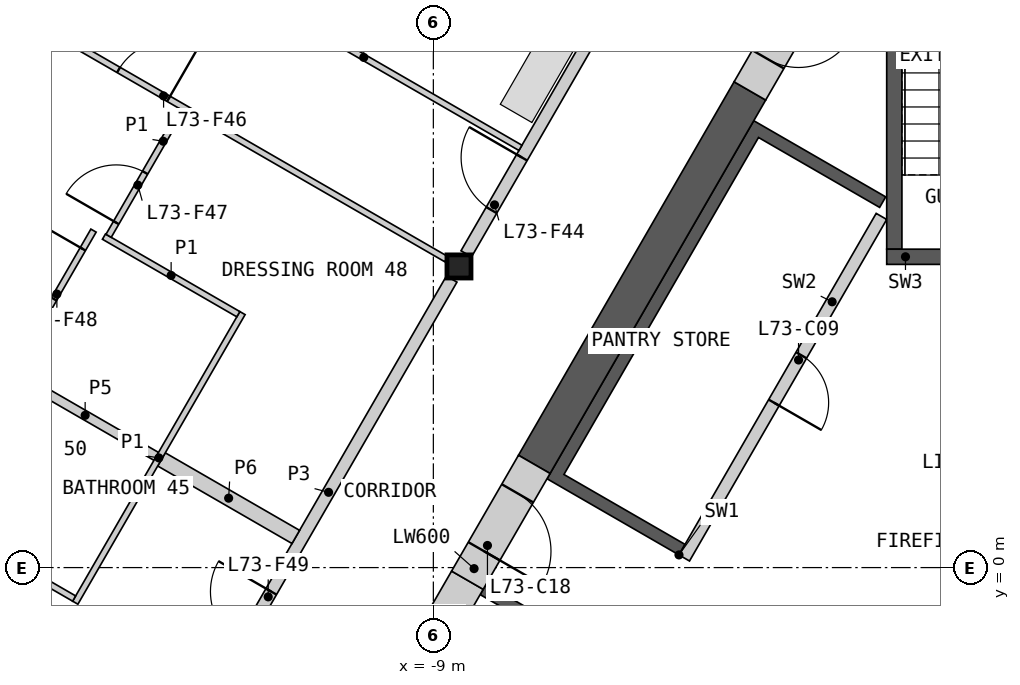
"""IFC4 building model, lengths in metres.
Left out: names, types, materials, properties, quantities, classifications, styles, units other than length and angle.
Written with IfcOpenShell. Run it as: python <this file> out.ifc"""

import sys

from ifc_helpers import new_model, si_unit, direction, frame, frame_2d, origin, origin_2d, place, context, subcontext, project, spatial, polyline, rectangle, i_section, outline, extrude, element, fill, save


model = new_model("IFC4")
c1 = context("Model", 3, precision=1e-05, world=origin(), true_north=direction((0.0, 1.0)))
c2 = subcontext(c1, "Body", "Model", "MODEL_VIEW")
j1 = project(units=[si_unit("LENGTHUNIT", "METRE"), si_unit("PLANEANGLEUNIT", "RADIAN")], contexts=[c1])
p1 = place(None, origin())
s1 = spatial("IfcSite", under=j1, at=p1, CompositionType="ELEMENT")
p2 = place(p1, origin())
s2 = spatial("IfcBuilding", under=s1, at=p2, CompositionType="ELEMENT")
p3 = place(p2, frame((0.0, 0.0, 329.0)))
s3 = spatial("IfcBuildingStorey", under=s2, at=p3, CompositionType="ELEMENT", Elevation=329.0)
p4 = place(p3, frame((-8.578, 4.953, 0.0), z_axis=(0.0, 0.0, 1.0), x_axis=(1.0, 0.0, 0.0)))
e1 = element("IfcColumn", 1, at=p4, inside=s3, PredefinedType="COLUMN", context=c2, shape_type="SweptSolid", body=[
    extrude(i_section(OverallWidth=0.396, OverallDepth=0.381, WebThickness=0.019, FlangeThickness=0.03, at=origin_2d()), origin(), (0.0, 0.0, 1.0), 3.4),
])
p5 = place(p3, origin())
e2 = element("IfcWall", 2, at=p5, inside=s3, PredefinedType="SHEAR", context=c2, shape_type="SweptSolid", body=[
    extrude(outline(polyline([(-6.061, -1.697), (-8.231, -0.444), (-8.131, -0.271), (-5.96, -1.524), (-6.061, -1.697)])), origin(), (0.0, 0.0, 1.0), 3.1),
])
p6 = place(p3, origin())
e3 = element("IfcWall", 3, at=p6, inside=s3, PredefinedType="SHEAR", context=c2, shape_type="SweptSolid", body=[
    extrude(outline(polyline([(-4.96, 0.208), (-7.131, 1.461), (-3.731, 7.35), (-1.561, 6.097), (-1.66, 5.924), (-3.652, 7.074), (-6.852, 1.531), (-4.861, 0.381), (-4.96, 0.208)])), origin(), (0.0, 0.0, 1.0), 3.1),
])
p7 = place(p3, frame((-1.631, 5.776, 0.0), z_axis=(0.0, 0.0, 1.0), x_axis=(-0.499992876559, -0.866029516466, 0.0)))
e4 = element("IfcWall", 4, at=p7, inside=s3, PredefinedType="SOLIDWALL", context=c2, shape_type="SweptSolid", body=[
    extrude(rectangle(XDim=6.486, YDim=0.2, at=frame_2d((3.243, 0.0))), origin(), (0.0, 0.0, 1.0), 3.1),
])
p8 = place(p7, frame((2.637, 0.0, 0.0)))
e5 = element("IfcOpeningElement", 5, at=p8, cuts=e4, PredefinedType="OPENING", context=c2, shape_type="SweptSolid", body=[
    extrude(rectangle(XDim=0.9, YDim=2.1, at=frame_2d((0.45, 1.05))), frame((0.0, 0.11, 0.0), z_axis=(0.0, -1.0, 0.0), x_axis=(1.0, 0.0, 0.0)), (0.0, 0.0, 1.0), 0.22),
])
p9 = place(p3, origin())
e6 = element("IfcWall", 6, at=p9, inside=s3, PredefinedType="SHEAR", context=c2, shape_type="SweptSolid", body=[
    extrude(outline(polyline([(-1.294, 10.837), (-1.544, 11.087), (-1.544, 5.237), (-1.294, 5.237), (-1.294, 10.837)])), origin(), (0.0, 0.0, 1.0), 3.1),
])
p10 = place(p3, frame((1.544, 5.112, 0.0), z_axis=(0.0, 0.0, 1.0), x_axis=(-1.0, 0.0, 0.0)))
e7 = element("IfcWall", 7, at=p10, inside=s3, PredefinedType="SHEAR", context=c2, shape_type="SweptSolid", body=[
    extrude(rectangle(XDim=3.088, YDim=0.25, at=frame_2d((1.544, 0.0))), origin(), (0.0, 0.0, 1.0), 3.1),
])
p11 = place(p10, frame((0.994, 0.0, 0.0)))
e8 = element("IfcOpeningElement", 8, at=p11, cuts=e7, PredefinedType="OPENING", context=c2, shape_type="SweptSolid", body=[
    extrude(rectangle(XDim=1.1, YDim=2.1, at=frame_2d((0.55, 1.05))), frame((0.0, 0.135, 0.0), z_axis=(0.0, -1.0, 0.0), x_axis=(1.0, 0.0, 0.0)), (0.0, 0.0, 1.0), 0.27),
])
p12 = place(p3, frame((-3.794, 7.84, 0.0), z_axis=(0.0, 0.0, 1.0), x_axis=(-0.499974747889, -0.866039982607, 0.0)))
e9 = element("IfcWall", 9, at=p12, inside=s3, PredefinedType="SHEAR", context=c2, shape_type="SweptSolid", body=[
    extrude(rectangle(XDim=7.092, YDim=0.6, at=frame_2d((3.546, 0.0))), origin(), (0.0, 0.0, 1.0), 3.1),
])
p13 = place(p3, frame((-8.44, -0.208, 0.0), z_axis=(0.0, 0.0, 1.0), x_axis=(-0.499997052475, -0.866027105532, 0.0)))
e10 = element("IfcWall", 10, at=p13, inside=s3, PredefinedType="SHEAR", context=c2, shape_type="SweptSolid", body=[
    extrude(rectangle(XDim=3.001, YDim=0.6, at=frame_2d((1.501, 0.0))), origin(), (0.0, 0.0, 1.0), 3.1),
])
p14 = place(p13, frame((1.4, 0.0, 0.0)))
e11 = element("IfcOpeningElement", 11, at=p14, cuts=e10, PredefinedType="OPENING", context=c2, shape_type="SweptSolid", body=[
    extrude(rectangle(XDim=1.0, YDim=2.1, at=frame_2d((0.5, 1.05))), frame((0.0, 0.31, 0.0), z_axis=(0.0, -1.0, 0.0), x_axis=(1.0, 0.0, 0.0)), (0.0, 0.0, 1.0), 0.62),
])
p15 = place(p3, frame((-2.694, 9.745, 0.0), z_axis=(0.0, 0.0, 1.0), x_axis=(-0.50002983664, -0.866008176907, 0.0)))
e12 = element("IfcWall", 12, at=p15, inside=s3, PredefinedType="SHEAR", context=c2, shape_type="SweptSolid", body=[
    extrude(rectangle(XDim=2.2, YDim=0.6, at=frame_2d((1.1, 0.0))), origin(), (0.0, 0.0, 1.0), 3.1),
])
p16 = place(p15, frame((0.6, 0.0, 0.0)))
e13 = element("IfcOpeningElement", 13, at=p16, cuts=e12, PredefinedType="OPENING", context=c2, shape_type="SweptSolid", body=[
    extrude(rectangle(XDim=1.0, YDim=2.1, at=frame_2d((0.5, 1.05))), frame((0.0, 0.31, 0.0), z_axis=(0.0, -1.0, 0.0), x_axis=(1.0, 0.0, 0.0)), (0.0, 0.0, 1.0), 0.62),
])
p17 = place(p3, frame((-7.34, 1.698, 0.0), z_axis=(0.0, 0.0, 1.0), x_axis=(-0.50002983664, -0.866008176907, 0.0)))
e14 = element("IfcWall", 14, at=p17, inside=s3, PredefinedType="SHEAR", context=c2, shape_type="SweptSolid", body=[
    extrude(rectangle(XDim=2.2, YDim=0.6, at=frame_2d((1.1, 0.0))), origin(), (0.0, 0.0, 1.0), 3.1),
])
p18 = place(p17, frame((0.55, 0.0, 0.0)))
e15 = element("IfcOpeningElement", 15, at=p18, cuts=e14, PredefinedType="OPENING", context=c2, shape_type="SweptSolid", body=[
    extrude(rectangle(XDim=1.1, YDim=2.1, at=frame_2d((0.55, 1.05))), frame((0.0, 0.31, 0.0), z_axis=(0.0, -1.0, 0.0), x_axis=(1.0, 0.0, 0.0)), (0.0, 0.0, 1.0), 0.62),
])
p19 = place(p3, frame((-8.458, 5.16, 0.0), z_axis=(0.0, 0.0, 1.0), x_axis=(0.499984266882, 0.866034487114, 0.0)))
e16 = element("IfcWall", 16, at=p19, inside=s3, PredefinedType="PARTITIONING", context=c2, shape_type="SweptSolid", body=[
    extrude(rectangle(XDim=8.099, YDim=0.2, at=frame_2d((4.049, 0.0))), origin(), (0.0, 0.0, 1.0), 3.1),
])
p20 = place(p19, frame((5.935, 0.0, 0.0)))
e17 = element("IfcOpeningElement", 17, at=p20, cuts=e16, PredefinedType="OPENING", context=c2, shape_type="SweptSolid", body=[
    extrude(rectangle(XDim=1.0, YDim=2.1, at=frame_2d((0.5, 1.05))), frame((0.0, 0.11, 0.0), z_axis=(0.0, -1.0, 0.0), x_axis=(1.0, 0.0, 0.0)), (0.0, 0.0, 1.0), 0.22),
])
p21 = place(p19, frame((0.83, 0.0, 0.0)))
e18 = element("IfcOpeningElement", 18, at=p21, cuts=e16, PredefinedType="OPENING", context=c2, shape_type="SweptSolid", body=[
    extrude(rectangle(XDim=1.0, YDim=2.1, at=frame_2d((0.5, 1.05))), frame((0.0, 0.11, 0.0), z_axis=(0.0, -1.0, 0.0), x_axis=(1.0, 0.0, 0.0)), (0.0, 0.0, 1.0), 0.22),
])
p22 = place(p3, frame((-12.748, -2.269, 0.0), z_axis=(0.0, 0.0, 1.0), x_axis=(0.499984266882, 0.866034487114, 0.0)))
e19 = element("IfcWall", 19, at=p22, inside=s3, PredefinedType="PARTITIONING", context=c2, shape_type="SweptSolid", body=[
    extrude(rectangle(XDim=8.099, YDim=0.2, at=frame_2d((4.049, 0.0))), origin(), (0.0, 0.0, 1.0), 3.1),
])
p23 = place(p22, frame((1.164, 0.0, 0.0)))
e20 = element("IfcOpeningElement", 20, at=p23, cuts=e19, PredefinedType="OPENING", context=c2, shape_type="SweptSolid", body=[
    extrude(rectangle(XDim=1.0, YDim=2.1, at=frame_2d((0.5, 1.05))), frame((0.0, 0.11, 0.0), z_axis=(0.0, -1.0, 0.0), x_axis=(1.0, 0.0, 0.0)), (0.0, 0.0, 1.0), 0.22),
])
p24 = place(p3, frame((-13.471, 1.779, 0.0), z_axis=(0.0, 0.0, 1.0), x_axis=(0.865989465428, -0.500062241894, 0.0)))
e21 = element("IfcWall", 21, at=p24, inside=s3, PredefinedType="PARTITIONING", context=c2, shape_type="SweptSolid", body=[
    extrude(rectangle(XDim=2.55, YDim=0.25, at=frame_2d((1.275, 0.0))), origin(), (0.0, 0.0, 1.0), 2.33),
])
p25 = place(p3, frame((-15.896, 3.179, 0.0), z_axis=(0.0, 0.0, 1.0), x_axis=(0.866059108428, -0.4999416173, 0.0)))
e22 = element("IfcWall", 22, at=p25, inside=s3, PredefinedType="PLUMBINGWALL", context=c2, shape_type="SweptSolid", body=[
    extrude(rectangle(XDim=2.7, YDim=0.15, at=frame_2d((1.35, 0.0))), origin(), (0.0, 0.0, 1.0), 2.33),
])
p26 = place(p3, frame((-24.815, 2.33, 0.0), z_axis=(0.0, 0.0, 1.0), x_axis=(0.866027776657, -0.499995890042, 0.0)))
e23 = element("IfcWall", 23, at=p26, inside=s3, PredefinedType="PARTITIONING", context=c2, shape_type="SweptSolid", body=[
    extrude(rectangle(XDim=12.649, YDim=0.1, at=frame_2d((6.325, 0.0))), origin(), (0.0, 0.0, 1.0), 2.33),
])
p27 = place(p26, frame((3.176, 0.0, 0.0)))
e24 = element("IfcOpeningElement", 24, at=p27, cuts=e23, PredefinedType="OPENING", context=c2, shape_type="SweptSolid", body=[
    extrude(rectangle(XDim=0.95, YDim=2.1, at=frame_2d((0.475, 1.05))), frame((0.0, 0.06, 0.0), z_axis=(0.0, -1.0, 0.0), x_axis=(1.0, 0.0, 0.0)), (0.0, 0.0, 1.0), 0.12),
])
p28 = place(p3, frame((-19.615, 11.325, 0.0), z_axis=(0.0, 0.0, 1.0), x_axis=(0.86602139559, -0.500006942333, 0.0)))
e25 = element("IfcWall", 25, at=p28, inside=s3, PredefinedType="PARTITIONING", context=c2, shape_type="SweptSolid", body=[
    extrude(rectangle(XDim=12.505, YDim=0.1, at=frame_2d((6.252, 0.0))), origin(), (0.0, 0.0, 1.0), 2.33),
])
p29 = place(p28, frame((6.28, 0.0, 0.0)))
e26 = element("IfcOpeningElement", 26, at=p29, cuts=e25, PredefinedType="OPENING", context=c2, shape_type="SweptSolid", body=[
    extrude(rectangle(XDim=0.95, YDim=2.1, at=frame_2d((0.475, 1.05))), frame((0.0, 0.06, 0.0), z_axis=(0.0, -1.0, 0.0), x_axis=(1.0, 0.0, 0.0)), (0.0, 0.0, 1.0), 0.12),
])
p30 = place(p3, frame((-12.721, 9.878, 0.0), z_axis=(0.0, 0.0, 1.0), x_axis=(0.866027751316, -0.499995933934, 0.0)))
e27 = element("IfcWall", 27, at=p30, inside=s3, PredefinedType="PARTITIONING", context=c2, shape_type="SweptSolid", body=[
    extrude(rectangle(XDim=5.95, YDim=0.1, at=frame_2d((2.975, 0.0))), origin(), (0.0, 0.0, 1.0), 2.33),
])
p31 = place(p30, frame((0.65, 0.0, 0.0)))
e28 = element("IfcOpeningElement", 28, at=p31, cuts=e27, PredefinedType="OPENING", context=c2, shape_type="SweptSolid", body=[
    extrude(rectangle(XDim=0.95, YDim=2.1, at=frame_2d((0.475, 1.05))), frame((0.0, 0.06, 0.0), z_axis=(0.0, -1.0, 0.0), x_axis=(1.0, 0.0, 0.0)), (0.0, 0.0, 1.0), 0.12),
])
p32 = place(p3, frame((-17.314, 0.823, 0.0), z_axis=(0.0, 0.0, 1.0), x_axis=(0.499988730927, 0.866031909889, 0.0)))
e29 = element("IfcWall", 29, at=p32, inside=s3, PredefinedType="PARTITIONING", context=c2, shape_type="SweptSolid", body=[
    extrude(rectangle(XDim=5.45, YDim=0.1, at=frame_2d((2.725, 0.0))), origin(), (0.0, 0.0, 1.0), 2.33),
])
p33 = place(p32, frame((4.15, 0.0, 0.0)))
e30 = element("IfcOpeningElement", 30, at=p33, cuts=e29, PredefinedType="OPENING", context=c2, shape_type="SweptSolid", body=[
    extrude(rectangle(XDim=0.95, YDim=2.1, at=frame_2d((0.475, 1.05))), frame((0.0, 0.06, 0.0), z_axis=(0.0, -1.0, 0.0), x_axis=(1.0, 0.0, 0.0)), (0.0, 0.0, 1.0), 0.12),
])
p34 = place(p3, frame((-14.889, -0.577, 0.0), z_axis=(0.0, 0.0, 1.0), x_axis=(0.500015767406, 0.866016300277, 0.0)))
e31 = element("IfcWall", 31, at=p34, inside=s3, PredefinedType="PARTITIONING", context=c2, shape_type="SweptSolid", body=[
    extrude(rectangle(XDim=5.5, YDim=0.1, at=frame_2d((2.75, 0.0))), origin(), (0.0, 0.0, 1.0), 2.33),
])
p35 = place(p3, frame((-17.246, 0.841, 0.0), z_axis=(0.0, 0.0, 1.0), x_axis=(0.86599734893, -0.500048589285, 0.0)))
e32 = element("IfcWall", 32, at=p35, inside=s3, PredefinedType="PARTITIONING", context=c2, shape_type="SweptSolid", body=[
    extrude(rectangle(XDim=2.7, YDim=0.1, at=frame_2d((1.35, 0.0))), origin(), (0.0, 0.0, 1.0), 2.33),
])
p36 = place(p35, frame((0.25, 0.0, 0.0)))
e33 = element("IfcOpeningElement", 33, at=p36, cuts=e32, PredefinedType="OPENING", context=c2, shape_type="SweptSolid", body=[
    extrude(rectangle(XDim=0.95, YDim=2.1, at=frame_2d((0.475, 1.05))), frame((0.0, 0.06, 0.0), z_axis=(0.0, -1.0, 0.0), x_axis=(1.0, 0.0, 0.0)), (0.0, 0.0, 1.0), 0.12),
])
p37 = place(p3, frame((-14.417, 5.443, 0.0), z_axis=(0.0, 0.0, 1.0), x_axis=(0.865991210529, -0.500059219779, 0.0)))
e34 = element("IfcWall", 34, at=p37, inside=s3, PredefinedType="PARTITIONING", context=c2, shape_type="SweptSolid", body=[
    extrude(rectangle(XDim=2.552, YDim=0.1, at=frame_2d((1.276, 0.0))), origin(), (0.0, 0.0, 1.0), 2.33),
])
p38 = place(p3, frame((-14.341, 5.457, 0.0), z_axis=(0.0, 0.0, 1.0), x_axis=(0.499954846121, 0.866051471819, 0.0)))
e35 = element("IfcWall", 35, at=p38, inside=s3, PredefinedType="PARTITIONING", context=c2, shape_type="SweptSolid", body=[
    extrude(rectangle(XDim=2.395, YDim=0.1, at=frame_2d((1.197, 0.0))), origin(), (0.0, 0.0, 1.0), 2.33),
])
p39 = place(p38, frame((0.25, 0.0, 0.0)))
e36 = element("IfcOpeningElement", 36, at=p39, cuts=e35, PredefinedType="OPENING", context=c2, shape_type="SweptSolid", body=[
    extrude(rectangle(XDim=0.95, YDim=2.1, at=frame_2d((0.475, 1.05))), frame((0.0, 0.06, 0.0), z_axis=(0.0, -1.0, 0.0), x_axis=(1.0, 0.0, 0.0)), (0.0, 0.0, 1.0), 0.12),
])
p40 = place(p8, origin())
e37 = element("IfcDoor", 37, at=p40, inside=s3, OperationType="SINGLE_SWING_RIGHT", PredefinedType="DOOR", context=c2, shape_type="SweptSolid", body=[
    extrude(rectangle(XDim=0.9, YDim=2.1, at=frame_2d((0.45, 1.05))), frame((0.0, 0.025, 0.0), z_axis=(0.0, -1.0, 0.0), x_axis=(1.0, 0.0, 0.0)), (0.0, 0.0, 1.0), 0.05),
])
fill(e5, e37)
p41 = place(p16, origin())
e38 = element("IfcDoor", 38, at=p41, inside=s3, OperationType="SINGLE_SWING_LEFT", PredefinedType="DOOR", context=c2, shape_type="SweptSolid", body=[
    extrude(rectangle(XDim=1.0, YDim=2.1, at=frame_2d((0.5, 1.05))), frame((0.0, 0.055, 0.0), z_axis=(0.0, -1.0, 0.0), x_axis=(1.0, 0.0, 0.0)), (0.0, 0.0, 1.0), 0.05),
])
fill(e13, e38)
p42 = place(p18, origin())
e39 = element("IfcDoor", 39, at=p42, inside=s3, OperationType="SINGLE_SWING_RIGHT", PredefinedType="DOOR", context=c2, shape_type="SweptSolid", body=[
    extrude(rectangle(XDim=1.1, YDim=2.1, at=frame_2d((0.55, 1.05))), frame((0.0, 0.055, 0.0), z_axis=(0.0, -1.0, 0.0), x_axis=(1.0, 0.0, 0.0)), (0.0, 0.0, 1.0), 0.05),
])
fill(e15, e39)
p43 = place(p21, origin())
e40 = element("IfcDoor", 40, at=p43, inside=s3, OperationType="SINGLE_SWING_RIGHT", PredefinedType="DOOR", context=c2, shape_type="SweptSolid", body=[
    extrude(rectangle(XDim=1.0, YDim=2.1, at=frame_2d((0.5, 1.05))), frame((0.0, 0.025, 0.0), z_axis=(0.0, -1.0, 0.0), x_axis=(1.0, 0.0, 0.0)), (0.0, 0.0, 1.0), 0.05),
])
fill(e18, e40)
p44 = place(p29, origin())
e41 = element("IfcDoor", 41, at=p44, inside=s3, OperationType="SINGLE_SWING_RIGHT", PredefinedType="DOOR", context=c2, shape_type="SweptSolid", body=[
    extrude(rectangle(XDim=0.95, YDim=2.1, at=frame_2d((0.475, 1.05))), frame((0.0, 0.025, 0.0), z_axis=(0.0, -1.0, 0.0), x_axis=(1.0, 0.0, 0.0)), (0.0, 0.0, 1.0), 0.05),
])
fill(e26, e41)
p45 = place(p39, origin())
e42 = element("IfcDoor", 42, at=p45, inside=s3, OperationType="SINGLE_SWING_LEFT", PredefinedType="DOOR", context=c2, shape_type="SweptSolid", body=[
    extrude(rectangle(XDim=0.95, YDim=2.1, at=frame_2d((0.475, 1.05))), frame((0.0, 0.025, 0.0), z_axis=(0.0, -1.0, 0.0), x_axis=(1.0, 0.0, 0.0)), (0.0, 0.0, 1.0), 0.05),
])
fill(e36, e42)
p46 = place(p33, origin())
e43 = element("IfcDoor", 43, at=p46, inside=s3, OperationType="SINGLE_SWING_RIGHT", PredefinedType="DOOR", context=c2, shape_type="SweptSolid", body=[
    extrude(rectangle(XDim=0.95, YDim=2.1, at=frame_2d((0.475, 1.05))), frame((0.0, 0.025, 0.0), z_axis=(0.0, -1.0, 0.0), x_axis=(1.0, 0.0, 0.0)), (0.0, 0.0, 1.0), 0.05),
])
fill(e30, e43)
p47 = place(p23, origin())
e44 = element("IfcDoor", 44, at=p47, inside=s3, OperationType="SINGLE_SWING_RIGHT", PredefinedType="DOOR", context=c2, shape_type="SweptSolid", body=[
    extrude(rectangle(XDim=1.0, YDim=2.1, at=frame_2d((0.5, 1.05))), frame((0.0, 0.025, 0.0), z_axis=(0.0, -1.0, 0.0), x_axis=(1.0, 0.0, 0.0)), (0.0, 0.0, 1.0), 0.05),
])
fill(e20, e44)
save(model, sys.argv[1])
